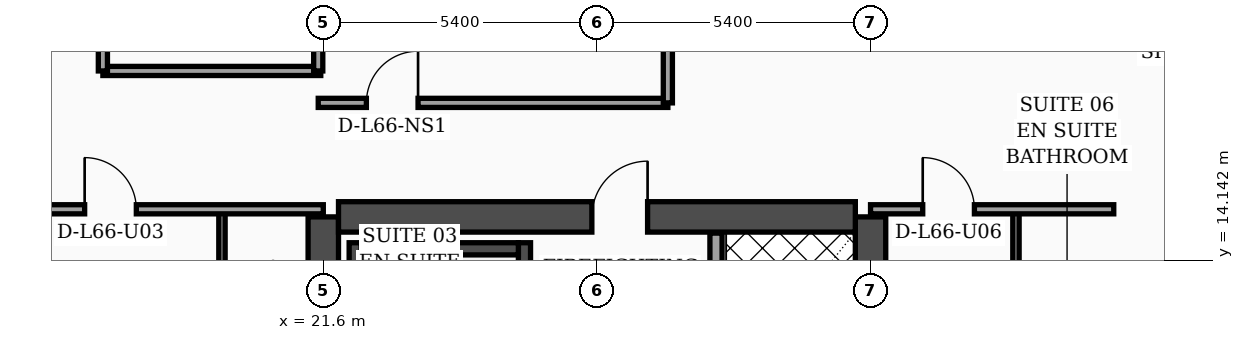
"""IFC4 building model, lengths in metres.
Left out: names, types, materials, properties, quantities, classifications, styles, units other than length and angle.
Written with IfcOpenShell. Run it as: python <this file> out.ifc"""

import sys

from ifc_helpers import new_model, si_unit, direction, frame, frame_2d, origin, place, context, subcontext, project, spatial, rectangle, extrude, element, fill, save


model = new_model("IFC4")
c1 = context("Model", 3, precision=1e-05, world=origin(), true_north=direction((0.0, 1.0)))
c2 = subcontext(c1, "Body", "Model", "MODEL_VIEW")
j1 = project(units=[si_unit("LENGTHUNIT", "METRE"), si_unit("PLANEANGLEUNIT", "RADIAN")], contexts=[c1])
p1 = place(None, origin())
s1 = spatial("IfcSite", under=j1, at=p1, CompositionType="ELEMENT")
p2 = place(p1, origin())
s2 = spatial("IfcBuilding", under=s1, at=p2, CompositionType="ELEMENT")
p3 = place(p2, frame((0.0, 0.0, 267.3)))
s3 = spatial("IfcBuildingStorey", under=s2, at=p3, CompositionType="ELEMENT", Elevation=267.3)
for number, where, z_axis, x_axis in (
    (1, (21.6, 4.6, 0.0), (0.0, 0.0, 1.0), (0.0, 1.0, 0.0)),
    (2, (32.4, 4.6, 0.0), (0.0, 0.0, 1.0), (0.0, 1.0, 0.0)),
):
    element("IfcWall", number, at=place(p3, frame(where, z_axis=z_axis, x_axis=x_axis)), inside=s3, PredefinedType="SHEAR", context=c2, shape_type="SweptSolid", body=[
        extrude(rectangle(XDim=10.4, YDim=0.6, at=frame_2d((5.2, 0.0))), origin(), (0.0, 0.0, 1.0), 3.56),
    ])
p4 = place(p3, frame((21.9, 15.0, 0.0), z_axis=(0.0, 0.0, 1.0), x_axis=(1.0, 0.0, 0.0)))
e3 = element("IfcWall", 3, at=p4, inside=s3, PredefinedType="SHEAR", context=c2, shape_type="SweptSolid", body=[
    extrude(rectangle(XDim=10.2, YDim=0.6, at=frame_2d((5.1, 0.0))), origin(), (0.0, 0.0, 1.0), 3.56),
])
p5 = place(p4, frame((5.0, 0.0, 0.0)))
e4 = element("IfcOpeningElement", 4, at=p5, cuts=e3, PredefinedType="OPENING", context=c2, shape_type="SweptSolid", body=[
    extrude(rectangle(XDim=1.1, YDim=2.2, at=frame_2d((0.55, 1.1))), frame((0.0, 0.31, 0.0), z_axis=(0.0, -1.0, 0.0), x_axis=(1.0, 0.0, 0.0)), (0.0, 0.0, 1.0), 0.62),
])
p6 = place(p3, frame((22.23, 4.9, 0.0), z_axis=(0.0, 0.0, 1.0), x_axis=(0.0, 1.0, 0.0)))
e5 = element("IfcWall", 5, at=p6, inside=s3, PredefinedType="SOLIDWALL", context=c2, shape_type="SweptSolid", body=[
    extrude(rectangle(XDim=9.59, YDim=0.24, at=frame_2d((4.795, 0.0))), origin(), (0.0, 0.0, 1.0), 3.56),
])
p7 = place(p3, frame((25.57, 4.9, 0.0), z_axis=(0.0, 0.0, 1.0), x_axis=(0.0, 1.0, 0.0)))
e6 = element("IfcWall", 6, at=p7, inside=s3, PredefinedType="SOLIDWALL", context=c2, shape_type="SweptSolid", body=[
    extrude(rectangle(XDim=9.59, YDim=0.24, at=frame_2d((4.795, 0.0))), origin(), (0.0, 0.0, 1.0), 3.56),
])
p8 = place(p7, frame((0.35, 0.0, 0.0)))
e7 = element("IfcOpeningElement", 7, at=p8, cuts=e6, PredefinedType="OPENING", context=c2, shape_type="SweptSolid", body=[
    extrude(rectangle(XDim=1.15, YDim=2.2, at=frame_2d((0.575, 1.1))), frame((0.0, 0.13, 0.0), z_axis=(0.0, -1.0, 0.0), x_axis=(1.0, 0.0, 0.0)), (0.0, 0.0, 1.0), 0.26),
])
p9 = place(p3, frame((22.35, 14.37, 0.0), z_axis=(0.0, 0.0, 1.0), x_axis=(1.0, 0.0, 0.0)))
e8 = element("IfcWall", 8, at=p9, inside=s3, PredefinedType="SOLIDWALL", context=c2, shape_type="SweptSolid", body=[
    extrude(rectangle(XDim=3.1, YDim=0.24, at=frame_2d((1.55, 0.0))), origin(), (0.0, 0.0, 1.0), 3.56),
])
p10 = place(p3, frame((43.83, 5.505, 0.0), z_axis=(0.0, 0.0, 1.0), x_axis=(-0.300509063924, 0.953778958931, 0.0)))
e9 = element("IfcWall", 9, at=p10, inside=s3, PredefinedType="SOLIDWALL", context=c2, shape_type="SweptSolid", body=[
    extrude(rectangle(XDim=30.814, YDim=0.32, at=frame_2d((15.407, 0.0))), origin(), (0.0, 0.0, 1.0), 3.56),
])
p11 = place(p10, frame((4.747, 0.0, 0.0)))
e10 = element("IfcOpeningElement", 10, at=p11, cuts=e9, PredefinedType="OPENING", context=c2, shape_type="SweptSolid", body=[
    extrude(rectangle(XDim=1.4, YDim=2.25, at=frame_2d((0.7, 1.125))), frame((0.0, 0.17, 0.0), z_axis=(0.0, -1.0, 0.0), x_axis=(1.0, 0.0, 0.0)), (0.0, 0.0, 1.0), 0.34),
])
p12 = place(p10, frame((9.889, 0.0, 0.7)))
e11 = element("IfcOpeningElement", 11, at=p12, cuts=e9, PredefinedType="OPENING", context=c2, shape_type="SweptSolid", body=[
    extrude(rectangle(XDim=1.6, YDim=1.65, at=frame_2d((0.8, 0.825))), frame((0.0, 0.17, 0.0), z_axis=(0.0, -1.0, 0.0), x_axis=(1.0, 0.0, 0.0)), (0.0, 0.0, 1.0), 0.34),
])
p13 = place(p10, frame((18.696, 0.0, 0.7)))
e12 = element("IfcOpeningElement", 12, at=p13, cuts=e9, PredefinedType="OPENING", context=c2, shape_type="SweptSolid", body=[
    extrude(rectangle(XDim=1.6, YDim=1.65, at=frame_2d((0.8, 0.825))), frame((0.0, 0.17, 0.0), z_axis=(0.0, -1.0, 0.0), x_axis=(1.0, 0.0, 0.0)), (0.0, 0.0, 1.0), 0.34),
])
p14 = place(p10, frame((1.6, 0.0, 0.75)))
e13 = element("IfcOpeningElement", 13, at=p14, cuts=e9, PredefinedType="OPENING", context=c2, shape_type="SweptSolid", body=[
    extrude(rectangle(XDim=1.5, YDim=1.6, at=frame_2d((0.75, 0.8))), frame((0.0, 0.17, 0.0), z_axis=(0.0, -1.0, 0.0), x_axis=(1.0, 0.0, 0.0)), (0.0, 0.0, 1.0), 0.34),
])
p15 = place(p10, frame((7.8, 0.0, 0.75)))
e14 = element("IfcOpeningElement", 14, at=p15, cuts=e9, PredefinedType="OPENING", context=c2, shape_type="SweptSolid", body=[
    extrude(rectangle(XDim=1.5, YDim=1.6, at=frame_2d((0.75, 0.8))), frame((0.0, 0.17, 0.0), z_axis=(0.0, -1.0, 0.0), x_axis=(1.0, 0.0, 0.0)), (0.0, 0.0, 1.0), 0.34),
])
p16 = place(p10, frame((11.95, 0.0, 0.75)))
e15 = element("IfcOpeningElement", 15, at=p16, cuts=e9, PredefinedType="OPENING", context=c2, shape_type="SweptSolid", body=[
    extrude(rectangle(XDim=1.5, YDim=1.6, at=frame_2d((0.75, 0.8))), frame((0.0, 0.17, 0.0), z_axis=(0.0, -1.0, 0.0), x_axis=(1.0, 0.0, 0.0)), (0.0, 0.0, 1.0), 0.34),
])
p17 = place(p10, frame((14.0, 0.0, 0.75)))
e16 = element("IfcOpeningElement", 16, at=p17, cuts=e9, PredefinedType="OPENING", context=c2, shape_type="SweptSolid", body=[
    extrude(rectangle(XDim=1.5, YDim=1.6, at=frame_2d((0.75, 0.8))), frame((0.0, 0.17, 0.0), z_axis=(0.0, -1.0, 0.0), x_axis=(1.0, 0.0, 0.0)), (0.0, 0.0, 1.0), 0.34),
])
p18 = place(p10, frame((16.55, 0.0, 0.75)))
e17 = element("IfcOpeningElement", 17, at=p18, cuts=e9, PredefinedType="OPENING", context=c2, shape_type="SweptSolid", body=[
    extrude(rectangle(XDim=1.5, YDim=1.6, at=frame_2d((0.75, 0.8))), frame((0.0, 0.17, 0.0), z_axis=(0.0, -1.0, 0.0), x_axis=(1.0, 0.0, 0.0)), (0.0, 0.0, 1.0), 0.34),
])
p19 = place(p10, frame((20.75, 0.0, 0.75)))
e18 = element("IfcOpeningElement", 18, at=p19, cuts=e9, PredefinedType="OPENING", context=c2, shape_type="SweptSolid", body=[
    extrude(rectangle(XDim=1.5, YDim=1.6, at=frame_2d((0.75, 0.8))), frame((0.0, 0.17, 0.0), z_axis=(0.0, -1.0, 0.0), x_axis=(1.0, 0.0, 0.0)), (0.0, 0.0, 1.0), 0.34),
])
p20 = place(p10, frame((23.3, 0.0, 0.75)))
e19 = element("IfcOpeningElement", 19, at=p20, cuts=e9, PredefinedType="OPENING", context=c2, shape_type="SweptSolid", body=[
    extrude(rectangle(XDim=1.5, YDim=1.6, at=frame_2d((0.75, 0.8))), frame((0.0, 0.17, 0.0), z_axis=(0.0, -1.0, 0.0), x_axis=(1.0, 0.0, 0.0)), (0.0, 0.0, 1.0), 0.34),
])
p21 = place(p10, frame((26.4, 0.0, 0.75)))
e20 = element("IfcOpeningElement", 20, at=p21, cuts=e9, PredefinedType="OPENING", context=c2, shape_type="SweptSolid", body=[
    extrude(rectangle(XDim=1.5, YDim=1.6, at=frame_2d((0.75, 0.8))), frame((0.0, 0.17, 0.0), z_axis=(0.0, -1.0, 0.0), x_axis=(1.0, 0.0, 0.0)), (0.0, 0.0, 1.0), 0.34),
])
p22 = place(p3, frame((29.35, 4.92, 0.0), z_axis=(0.0, 0.0, 1.0), x_axis=(0.0, 1.0, 0.0)))
e21 = element("IfcWall", 21, at=p22, inside=s3, PredefinedType="SOLIDWALL", context=c2, shape_type="SweptSolid", body=[
    extrude(rectangle(XDim=9.76, YDim=0.24, at=frame_2d((4.88, 0.0))), origin(), (0.0, 0.0, 1.0), 3.56),
])
p23 = place(p22, frame((0.55, 0.0, 0.0)))
e22 = element("IfcOpeningElement", 22, at=p23, cuts=e21, PredefinedType="OPENING", context=c2, shape_type="SweptSolid", body=[
    extrude(rectangle(XDim=1.3, YDim=2.35, at=frame_2d((0.65, 1.175))), frame((0.0, 0.13, 0.0), z_axis=(0.0, -1.0, 0.0), x_axis=(1.0, 0.0, 0.0)), (0.0, 0.0, 1.0), 0.26),
])
p24 = place(p3, frame((19.6, 2.44, 0.0), z_axis=(0.0, 0.0, 1.0), x_axis=(0.0, 1.0, 0.0)))
e23 = element("IfcWall", 23, at=p24, inside=s3, PredefinedType="PARTITIONING", context=c2, shape_type="SweptSolid", body=[
    extrude(rectangle(XDim=12.71, YDim=0.125, at=frame_2d((6.355, 0.0))), origin(), (0.0, 0.0, 1.0), 2.59),
])
p25 = place(p24, frame((4.34, 0.0, 0.0)))
e24 = element("IfcOpeningElement", 24, at=p25, cuts=e23, PredefinedType="OPENING", context=c2, shape_type="SweptSolid", body=[
    extrude(rectangle(XDim=0.96, YDim=2.2, at=frame_2d((0.48, 1.1))), frame((0.0, 0.073, 0.0), z_axis=(0.0, -1.0, 0.0), x_axis=(1.0, 0.0, 0.0)), (0.0, 0.0, 1.0), 0.145),
])
p26 = place(p24, frame((10.18, 0.0, 0.0)))
e25 = element("IfcOpeningElement", 25, at=p26, cuts=e23, PredefinedType="OPENING", context=c2, shape_type="SweptSolid", body=[
    extrude(rectangle(XDim=0.9, YDim=2.15, at=frame_2d((0.45, 1.075))), frame((0.0, 0.073, 0.0), z_axis=(0.0, -1.0, 0.0), x_axis=(1.0, 0.0, 0.0)), (0.0, 0.0, 1.0), 0.145),
])
p27 = place(p3, frame((15.15, 15.15, 0.0), z_axis=(0.0, 0.0, 1.0), x_axis=(1.0, 0.0, 0.0)))
e26 = element("IfcWall", 26, at=p27, inside=s3, PredefinedType="PARTITIONING", context=c2, shape_type="SweptSolid", body=[
    extrude(rectangle(XDim=6.45, YDim=0.18, at=frame_2d((3.225, 0.0))), origin(), (0.0, 0.0, 1.0), 2.59),
])
p28 = place(p27, frame((1.74, 0.0, 0.0)))
e27 = element("IfcOpeningElement", 27, at=p28, cuts=e26, PredefinedType="OPENING", context=c2, shape_type="SweptSolid", body=[
    extrude(rectangle(XDim=1.02, YDim=2.2, at=frame_2d((0.51, 1.1))), frame((0.0, 0.1, 0.0), z_axis=(0.0, -1.0, 0.0), x_axis=(1.0, 0.0, 0.0)), (0.0, 0.0, 1.0), 0.2),
])
p29 = place(p3, frame((17.25, 17.88, 0.0), z_axis=(0.0, 0.0, 1.0), x_axis=(1.0, 0.0, 0.0)))
e28 = element("IfcWall", 28, at=p29, inside=s3, PredefinedType="PARTITIONING", context=c2, shape_type="SweptSolid", body=[
    extrude(rectangle(XDim=4.3, YDim=0.18, at=frame_2d((2.15, 0.0))), origin(), (0.0, 0.0, 1.0), 3.09),
])
p30 = place(p3, frame((21.5, 17.88, 0.0), z_axis=(0.0, 0.0, 1.0), x_axis=(0.0, 1.0, 0.0)))
e29 = element("IfcWall", 29, at=p30, inside=s3, PredefinedType="PARTITIONING", context=c2, shape_type="SweptSolid", body=[
    extrude(rectangle(XDim=6.44, YDim=0.18, at=frame_2d((3.22, 0.0))), origin(), (0.0, 0.0, 1.0), 3.09),
])
p31 = place(p3, frame((17.25, 17.88, 0.0), z_axis=(0.0, 0.0, 1.0), x_axis=(0.0, 1.0, 0.0)))
e30 = element("IfcWall", 30, at=p31, inside=s3, PredefinedType="PARTITIONING", context=c2, shape_type="SweptSolid", body=[
    extrude(rectangle(XDim=6.44, YDim=0.18, at=frame_2d((3.22, 0.0))), origin(), (0.0, 0.0, 1.0), 3.09),
])
p32 = place(p31, frame((0.65, 0.0, 0.0)))
e31 = element("IfcOpeningElement", 31, at=p32, cuts=e30, PredefinedType="OPENING", context=c2, shape_type="SweptSolid", body=[
    extrude(rectangle(XDim=0.98, YDim=2.15, at=frame_2d((0.49, 1.075))), frame((0.0, 0.1, 0.0), z_axis=(0.0, -1.0, 0.0), x_axis=(1.0, 0.0, 0.0)), (0.0, 0.0, 1.0), 0.2),
])
p33 = place(p31, frame((3.27, 0.0, 0.0)))
e32 = element("IfcOpeningElement", 32, at=p33, cuts=e30, PredefinedType="OPENING", context=c2, shape_type="SweptSolid", body=[
    extrude(rectangle(XDim=0.96, YDim=2.2, at=frame_2d((0.48, 1.1))), frame((0.0, 0.1, 0.0), z_axis=(0.0, -1.0, 0.0), x_axis=(1.0, 0.0, 0.0)), (0.0, 0.0, 1.0), 0.2),
])
p34 = place(p3, frame((35.27, 2.44, 0.0), z_axis=(0.0, 0.0, 1.0), x_axis=(0.0, 1.0, 0.0)))
e33 = element("IfcWall", 33, at=p34, inside=s3, PredefinedType="PARTITIONING", context=c2, shape_type="SweptSolid", body=[
    extrude(rectangle(XDim=12.71, YDim=0.125, at=frame_2d((6.355, 0.0))), origin(), (0.0, 0.0, 1.0), 2.99),
])
p35 = place(p34, frame((4.35, 0.0, 0.0)))
e34 = element("IfcOpeningElement", 34, at=p35, cuts=e33, PredefinedType="OPENING", context=c2, shape_type="SweptSolid", body=[
    extrude(rectangle(XDim=0.96, YDim=2.2, at=frame_2d((0.48, 1.1))), frame((0.0, 0.073, 0.0), z_axis=(0.0, -1.0, 0.0), x_axis=(1.0, 0.0, 0.0)), (0.0, 0.0, 1.0), 0.145),
])
p36 = place(p34, frame((10.21, 0.0, 0.0)))
e35 = element("IfcOpeningElement", 35, at=p36, cuts=e33, PredefinedType="OPENING", context=c2, shape_type="SweptSolid", body=[
    extrude(rectangle(XDim=0.9, YDim=2.15, at=frame_2d((0.45, 1.075))), frame((0.0, 0.073, 0.0), z_axis=(0.0, -1.0, 0.0), x_axis=(1.0, 0.0, 0.0)), (0.0, 0.0, 1.0), 0.145),
])
p37 = place(p3, frame((32.4, 15.15, 0.0), z_axis=(0.0, 0.0, 1.0), x_axis=(1.0, 0.0, 0.0)))
e36 = element("IfcWall", 36, at=p37, inside=s3, PredefinedType="PARTITIONING", context=c2, shape_type="SweptSolid", body=[
    extrude(rectangle(XDim=4.8, YDim=0.18, at=frame_2d((2.4, 0.0))), origin(), (0.0, 0.0, 1.0), 2.99),
])
p38 = place(p37, frame((1.03, 0.0, 0.0)))
e37 = element("IfcOpeningElement", 37, at=p38, cuts=e36, PredefinedType="OPENING", context=c2, shape_type="SweptSolid", body=[
    extrude(rectangle(XDim=1.02, YDim=2.2, at=frame_2d((0.51, 1.1))), frame((0.0, 0.1, 0.0), z_axis=(0.0, -1.0, 0.0), x_axis=(1.0, 0.0, 0.0)), (0.0, 0.0, 1.0), 0.2),
])
p39 = place(p3, frame((21.5, 17.25, 0.0), z_axis=(0.0, 0.0, 1.0), x_axis=(1.0, 0.0, 0.0)))
e38 = element("IfcWall", 38, at=p39, inside=s3, PredefinedType="PARTITIONING", context=c2, shape_type="SweptSolid", body=[
    extrude(rectangle(XDim=6.9, YDim=0.18, at=frame_2d((3.45, 0.0))), origin(), (0.0, 0.0, 1.0), 3.56),
])
p40 = place(p39, frame((0.95, 0.0, 0.0)))
e39 = element("IfcOpeningElement", 39, at=p40, cuts=e38, PredefinedType="OPENING", context=c2, shape_type="SweptSolid", body=[
    extrude(rectangle(XDim=1.02, YDim=2.2, at=frame_2d((0.51, 1.1))), frame((0.0, 0.1, 0.0), z_axis=(0.0, -1.0, 0.0), x_axis=(1.0, 0.0, 0.0)), (0.0, 0.0, 1.0), 0.2),
])
p41 = place(p3, frame((28.4, 17.25, 0.0), z_axis=(0.0, 0.0, 1.0), x_axis=(0.0, 1.0, 0.0)))
e40 = element("IfcWall", 40, at=p41, inside=s3, PredefinedType="PARTITIONING", context=c2, shape_type="SweptSolid", body=[
    extrude(rectangle(XDim=17.51, YDim=0.18, at=frame_2d((8.755, 0.0))), origin(), (0.0, 0.0, 1.0), 3.09),
])
p42 = place(p28, origin())
e41 = element("IfcDoor", 41, at=p42, inside=s3, OperationType="SINGLE_SWING_LEFT", PredefinedType="DOOR", context=c2, shape_type="SweptSolid", body=[
    extrude(rectangle(XDim=1.02, YDim=2.2, at=frame_2d((0.51, 1.1))), frame((0.0, 0.025, 0.0), z_axis=(0.0, -1.0, 0.0), x_axis=(1.0, 0.0, 0.0)), (0.0, 0.0, 1.0), 0.05),
])
fill(e27, e41)
p43 = place(p38, origin())
e42 = element("IfcDoor", 42, at=p43, inside=s3, OperationType="SINGLE_SWING_LEFT", PredefinedType="DOOR", context=c2, shape_type="SweptSolid", body=[
    extrude(rectangle(XDim=1.02, YDim=2.2, at=frame_2d((0.51, 1.1))), frame((0.0, 0.025, 0.0), z_axis=(0.0, -1.0, 0.0), x_axis=(1.0, 0.0, 0.0)), (0.0, 0.0, 1.0), 0.05),
])
fill(e37, e42)
p44 = place(p40, origin())
e43 = element("IfcDoor", 43, at=p44, inside=s3, OperationType="SINGLE_SWING_RIGHT", PredefinedType="DOOR", context=c2, shape_type="SweptSolid", body=[
    extrude(rectangle(XDim=1.02, YDim=2.2, at=frame_2d((0.51, 1.1))), frame((0.0, 0.025, 0.0), z_axis=(0.0, -1.0, 0.0), x_axis=(1.0, 0.0, 0.0)), (0.0, 0.0, 1.0), 0.05),
])
fill(e39, e43)
p45 = place(p5, origin())
e44 = element("IfcDoor", 44, at=p45, inside=s3, OperationType="SINGLE_SWING_RIGHT", PredefinedType="DOOR", context=c2, shape_type="SweptSolid", body=[
    extrude(rectangle(XDim=1.1, YDim=2.2, at=frame_2d((0.55, 1.1))), frame((0.0, 0.025, 0.0), z_axis=(0.0, -1.0, 0.0), x_axis=(1.0, 0.0, 0.0)), (0.0, 0.0, 1.0), 0.05),
])
fill(e4, e44)
save(model, sys.argv[1])
